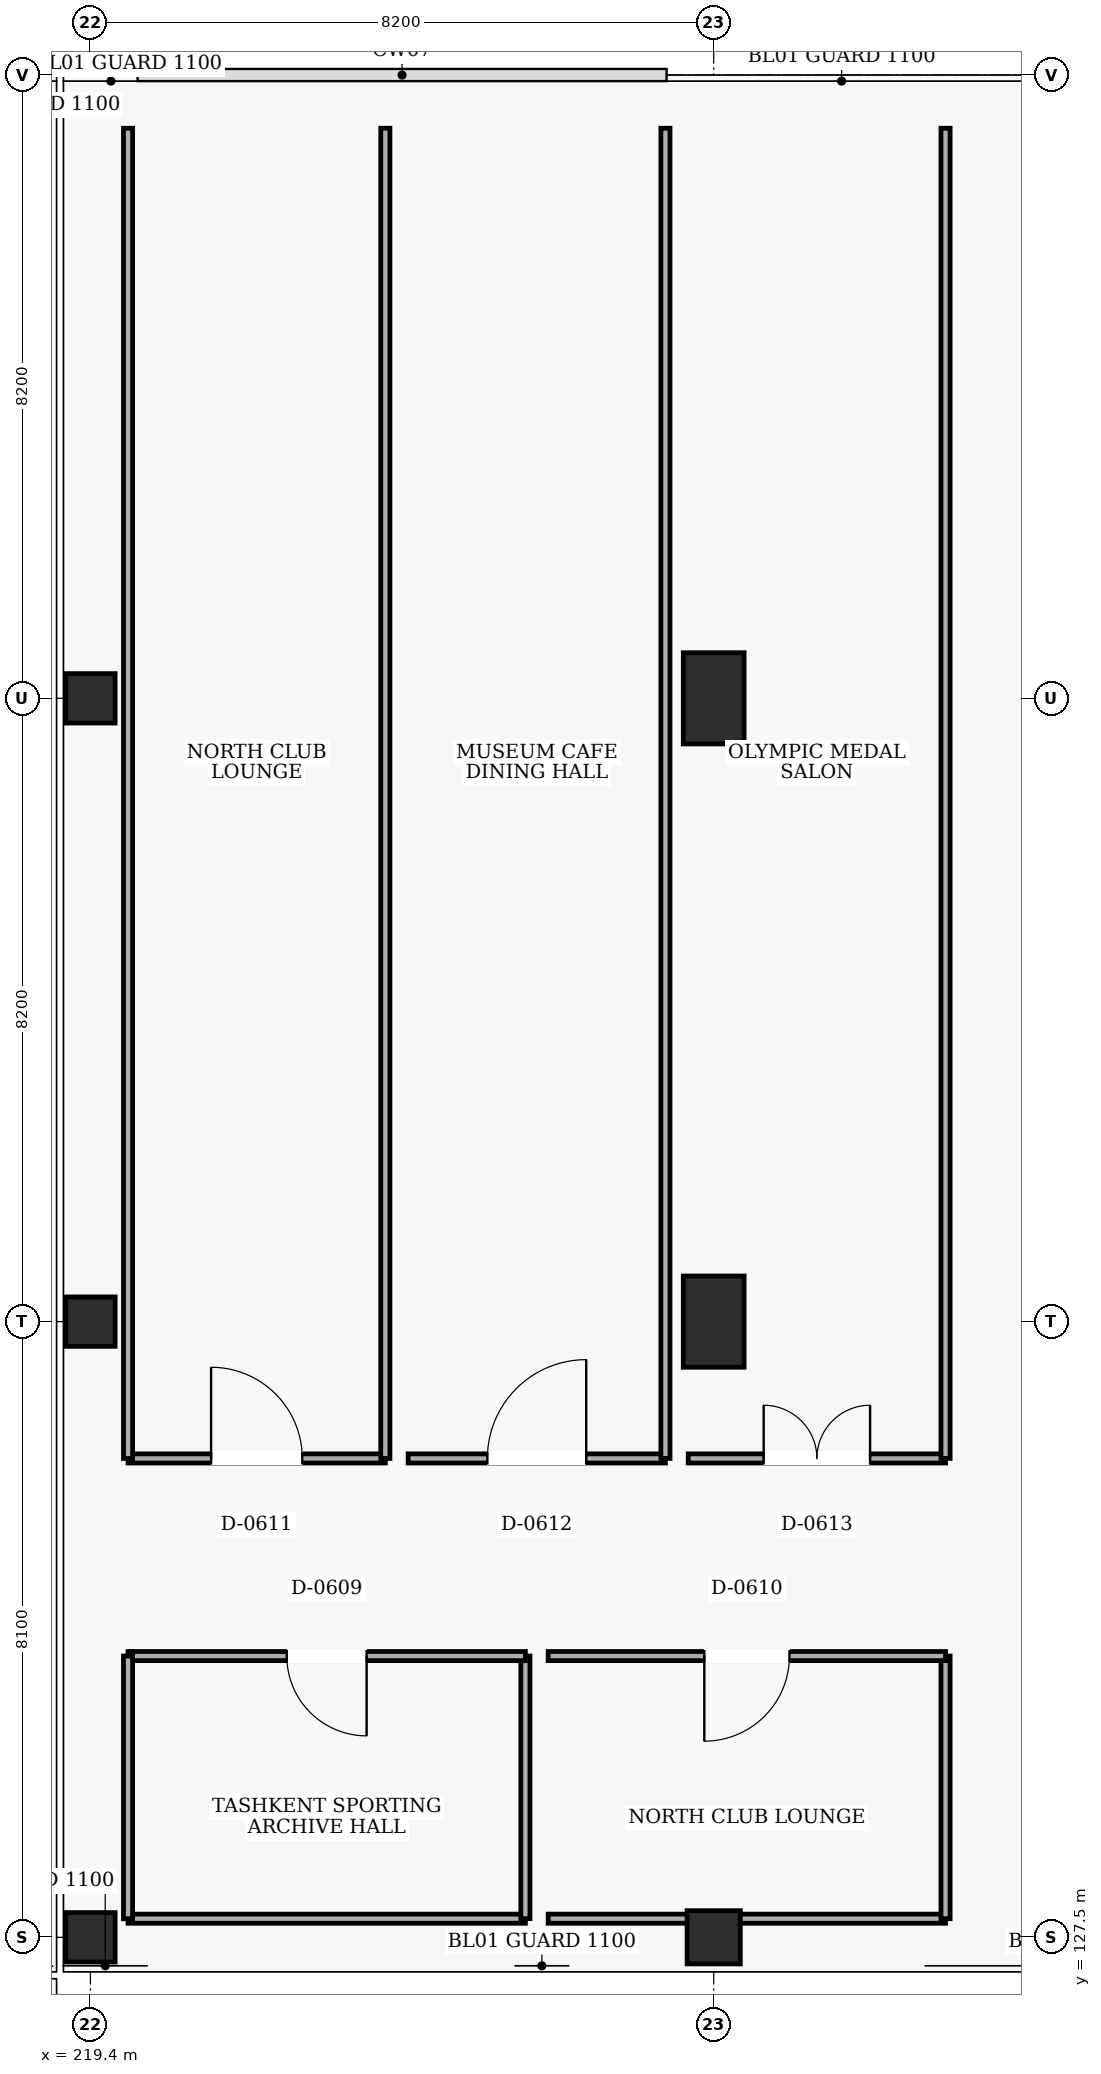
"""IFC4 building model, lengths in metres.
Left out: names, types, materials, properties, quantities, classifications, styles, units other than length and angle.
Written with IfcOpenShell. Run it as: python <this file> out.ifc"""

import sys

from ifc_helpers import new_model, si_unit, direction, frame, frame_2d, origin, origin_2d, place, context, subcontext, project, spatial, rectangle, extrude, element, fill, save


model = new_model("IFC4")
c1 = context("Model", 3, precision=1e-05, world=origin(), true_north=direction((0.0, 1.0)))
c2 = subcontext(c1, "Body", "Model", "MODEL_VIEW")
j1 = project(units=[si_unit("LENGTHUNIT", "METRE"), si_unit("PLANEANGLEUNIT", "RADIAN")], contexts=[c1])
p1 = place(None, origin())
s1 = spatial("IfcSite", under=j1, at=p1, CompositionType="ELEMENT")
p2 = place(p1, origin())
s2 = spatial("IfcBuilding", under=s1, at=p2, CompositionType="ELEMENT")
p3 = place(p2, frame((0.0, 0.0, 10.2)))
s3 = spatial("IfcBuildingStorey", under=s2, at=p3, CompositionType="ELEMENT", Elevation=10.2)
for number, where, z_axis, x_axis in (
    (1, (219.4, 127.5, 0.0), (0.0, 0.0, 1.0), (1.0, 0.0, 0.0)),
    (2, (219.4, 135.6, 0.0), (0.0, 0.0, 1.0), (1.0, 0.0, 0.0)),
    (3, (219.4, 143.8, 0.0), (0.0, 0.0, 1.0), (1.0, 0.0, 0.0)),
):
    element("IfcColumn", number, at=place(p3, frame(where, z_axis=z_axis, x_axis=x_axis)), inside=s3, PredefinedType="COLUMN", context=c2, shape_type="SweptSolid", body=[
        extrude(rectangle(XDim=0.65, YDim=0.65, at=origin_2d()), origin(), (0.0, 0.0, 1.0), 4.8),
    ])
p4 = place(p3, frame((227.6, 127.5, 0.0), z_axis=(0.0, 0.0, 1.0), x_axis=(1.0, 0.0, 0.0)))
e4 = element("IfcColumn", 4, at=p4, inside=s3, PredefinedType="COLUMN", context=c2, shape_type="SweptSolid", body=[
    extrude(rectangle(XDim=0.7, YDim=0.7, at=origin_2d()), origin(), (0.0, 0.0, 1.0), 4.8),
])
for number, where, z_axis, x_axis in (
    (5, (227.6, 135.6, 0.0), (0.0, 0.0, 1.0), (1.0, 0.0, 0.0)),
    (6, (227.6, 143.8, 0.0), (0.0, 0.0, 1.0), (1.0, 0.0, 0.0)),
):
    element("IfcColumn", number, at=place(p3, frame(where, z_axis=z_axis, x_axis=x_axis)), inside=s3, PredefinedType="COLUMN", context=c2, shape_type="SweptSolid", body=[
        extrude(rectangle(XDim=0.8, YDim=1.2, at=origin_2d()), origin(), (0.0, 0.0, 1.0), 4.8),
    ])
p5 = place(p3, frame((219.895, 127.745, 0.0), z_axis=(0.0, 0.0, 1.0), x_axis=(1.0, 0.0, 0.0)))
e7 = element("IfcWall", 7, at=p5, inside=s3, PredefinedType="PARTITIONING", context=c2, shape_type="SweptSolid", body=[
    extrude(rectangle(XDim=5.228, YDim=0.12, at=frame_2d((2.614, 0.0))), origin(), (0.0, 0.0, 1.0), 3.88),
])
p6 = place(p3, frame((225.123, 127.745, 0.0), z_axis=(0.0, 0.0, 1.0), x_axis=(0.0, 1.0, 0.0)))
e8 = element("IfcWall", 8, at=p6, inside=s3, PredefinedType="PARTITIONING", context=c2, shape_type="SweptSolid", body=[
    extrude(rectangle(XDim=3.455, YDim=0.12, at=frame_2d((1.728, 0.0))), origin(), (0.0, 0.0, 1.0), 4.48),
])
p7 = place(p3, frame((225.123, 131.2, 0.0), z_axis=(0.0, 0.0, 1.0), x_axis=(-1.0, 0.0, 0.0)))
e9 = element("IfcWall", 9, at=p7, inside=s3, PredefinedType="PARTITIONING", context=c2, shape_type="SweptSolid", body=[
    extrude(rectangle(XDim=5.228, YDim=0.12, at=frame_2d((2.614, 0.0))), origin(), (0.0, 0.0, 1.0), 4.48),
])
p8 = place(p7, frame((2.089, 0.0, 0.0)))
e10 = element("IfcOpeningElement", 10, at=p8, cuts=e9, PredefinedType="OPENING", context=c2, shape_type="SweptSolid", body=[
    extrude(rectangle(XDim=1.05, YDim=2.15, at=frame_2d((0.525, 1.075))), frame((0.0, 0.07, 0.0), z_axis=(0.0, -1.0, 0.0), x_axis=(1.0, 0.0, 0.0)), (0.0, 0.0, 1.0), 0.14),
])
p9 = place(p3, frame((219.895, 131.2, 0.0), z_axis=(0.0, 0.0, 1.0), x_axis=(0.0, -1.0, 0.0)))
e11 = element("IfcWall", 11, at=p9, inside=s3, PredefinedType="PARTITIONING", context=c2, shape_type="SweptSolid", body=[
    extrude(rectangle(XDim=3.455, YDim=0.12, at=frame_2d((1.728, 0.0))), origin(), (0.0, 0.0, 1.0), 4.48),
])
p10 = place(p3, frame((225.423, 127.745, 0.0), z_axis=(0.0, 0.0, 1.0), x_axis=(1.0, 0.0, 0.0)))
e12 = element("IfcWall", 12, at=p10, inside=s3, PredefinedType="PARTITIONING", context=c2, shape_type="SweptSolid", body=[
    extrude(rectangle(XDim=5.227, YDim=0.12, at=frame_2d((2.614, 0.0))), origin(), (0.0, 0.0, 1.0), 3.88),
])
p11 = place(p3, frame((230.65, 127.745, 0.0), z_axis=(0.0, 0.0, 1.0), x_axis=(0.0, 1.0, 0.0)))
e13 = element("IfcWall", 13, at=p11, inside=s3, PredefinedType="PARTITIONING", context=c2, shape_type="SweptSolid", body=[
    extrude(rectangle(XDim=3.455, YDim=0.12, at=frame_2d((1.728, 0.0))), origin(), (0.0, 0.0, 1.0), 4.48),
])
p12 = place(p3, frame((230.65, 131.2, 0.0), z_axis=(0.0, 0.0, 1.0), x_axis=(-1.0, 0.0, 0.0)))
e14 = element("IfcWall", 14, at=p12, inside=s3, PredefinedType="PARTITIONING", context=c2, shape_type="SweptSolid", body=[
    extrude(rectangle(XDim=5.227, YDim=0.12, at=frame_2d((2.614, 0.0))), origin(), (0.0, 0.0, 1.0), 4.48),
])
p13 = place(p12, frame((2.054, 0.0, 0.0)))
e15 = element("IfcOpeningElement", 15, at=p13, cuts=e14, PredefinedType="OPENING", context=c2, shape_type="SweptSolid", body=[
    extrude(rectangle(XDim=1.12, YDim=2.15, at=frame_2d((0.56, 1.075))), frame((0.0, 0.07, 0.0), z_axis=(0.0, -1.0, 0.0), x_axis=(1.0, 0.0, 0.0)), (0.0, 0.0, 1.0), 0.14),
])
p14 = place(p3, frame((219.895, 133.8, 0.0), z_axis=(0.0, 0.0, 1.0), x_axis=(1.0, 0.0, 0.0)))
e16 = element("IfcWall", 16, at=p14, inside=s3, PredefinedType="PARTITIONING", context=c2, shape_type="SweptSolid", body=[
    extrude(rectangle(XDim=3.385, YDim=0.12, at=frame_2d((1.692, 0.0))), origin(), (0.0, 0.0, 1.0), 4.48),
])
p15 = place(p14, frame((1.093, 0.0, 0.0)))
e17 = element("IfcOpeningElement", 17, at=p15, cuts=e16, PredefinedType="OPENING", context=c2, shape_type="SweptSolid", body=[
    extrude(rectangle(XDim=1.2, YDim=2.15, at=frame_2d((0.6, 1.075))), frame((0.0, 0.07, 0.0), z_axis=(0.0, -1.0, 0.0), x_axis=(1.0, 0.0, 0.0)), (0.0, 0.0, 1.0), 0.14),
])
for number, where, z_axis, x_axis in (
    (18, (223.28, 133.8, 0.0), (0.0, 0.0, 1.0), (0.0, 1.0, 0.0)),
    (19, (219.895, 151.3, 0.0), (0.0, 0.0, 1.0), (0.0, -1.0, 0.0)),
):
    element("IfcWall", number, at=place(p3, frame(where, z_axis=z_axis, x_axis=x_axis)), inside=s3, PredefinedType="PARTITIONING", context=c2, shape_type="SweptSolid", body=[
        extrude(rectangle(XDim=17.5, YDim=0.12, at=frame_2d((8.75, 0.0))), origin(), (0.0, 0.0, 1.0), 4.48),
    ])
p16 = place(p3, frame((223.58, 133.8, 0.0), z_axis=(0.0, 0.0, 1.0), x_axis=(1.0, 0.0, 0.0)))
e20 = element("IfcWall", 20, at=p16, inside=s3, PredefinedType="PARTITIONING", context=c2, shape_type="SweptSolid", body=[
    extrude(rectangle(XDim=3.385, YDim=0.12, at=frame_2d((1.692, 0.0))), origin(), (0.0, 0.0, 1.0), 4.48),
])
p17 = place(p16, frame((1.042, 0.0, 0.0)))
e21 = element("IfcOpeningElement", 21, at=p17, cuts=e20, PredefinedType="OPENING", context=c2, shape_type="SweptSolid", body=[
    extrude(rectangle(XDim=1.3, YDim=2.2, at=frame_2d((0.65, 1.1))), frame((0.0, 0.07, 0.0), z_axis=(0.0, -1.0, 0.0), x_axis=(1.0, 0.0, 0.0)), (0.0, 0.0, 1.0), 0.14),
])
p18 = place(p3, frame((226.965, 133.8, 0.0), z_axis=(0.0, 0.0, 1.0), x_axis=(0.0, 1.0, 0.0)))
e22 = element("IfcWall", 22, at=p18, inside=s3, PredefinedType="PARTITIONING", context=c2, shape_type="SweptSolid", body=[
    extrude(rectangle(XDim=17.5, YDim=0.12, at=frame_2d((8.75, 0.0))), origin(), (0.0, 0.0, 1.0), 4.48),
])
p19 = place(p3, frame((227.265, 133.8, 0.0), z_axis=(0.0, 0.0, 1.0), x_axis=(1.0, 0.0, 0.0)))
e23 = element("IfcWall", 23, at=p19, inside=s3, PredefinedType="PARTITIONING", context=c2, shape_type="SweptSolid", body=[
    extrude(rectangle(XDim=3.385, YDim=0.12, at=frame_2d((1.692, 0.0))), origin(), (0.0, 0.0, 1.0), 4.48),
])
p20 = place(p19, frame((0.992, 0.0, 0.0)))
e24 = element("IfcOpeningElement", 24, at=p20, cuts=e23, PredefinedType="OPENING", context=c2, shape_type="SweptSolid", body=[
    extrude(rectangle(XDim=1.4, YDim=2.2, at=frame_2d((0.7, 1.1))), frame((0.0, 0.07, 0.0), z_axis=(0.0, -1.0, 0.0), x_axis=(1.0, 0.0, 0.0)), (0.0, 0.0, 1.0), 0.14),
])
p21 = place(p3, frame((230.65, 133.8, 0.0), z_axis=(0.0, 0.0, 1.0), x_axis=(0.0, 1.0, 0.0)))
e25 = element("IfcWall", 25, at=p21, inside=s3, PredefinedType="PARTITIONING", context=c2, shape_type="SweptSolid", body=[
    extrude(rectangle(XDim=17.5, YDim=0.12, at=frame_2d((8.75, 0.0))), origin(), (0.0, 0.0, 1.0), 4.48),
])
p22 = place(p8, origin())
e26 = element("IfcDoor", 26, at=p22, inside=s3, OperationType="SINGLE_SWING_LEFT", PredefinedType="DOOR", context=c2, shape_type="SweptSolid", body=[
    extrude(rectangle(XDim=1.05, YDim=2.15, at=frame_2d((0.525, 1.075))), frame((0.0, 0.025, 0.0), z_axis=(0.0, -1.0, 0.0), x_axis=(1.0, 0.0, 0.0)), (0.0, 0.0, 1.0), 0.05),
])
fill(e10, e26)
p23 = place(p13, origin())
e27 = element("IfcDoor", 27, at=p23, inside=s3, OperationType="SINGLE_SWING_RIGHT", PredefinedType="DOOR", context=c2, shape_type="SweptSolid", body=[
    extrude(rectangle(XDim=1.12, YDim=2.15, at=frame_2d((0.56, 1.075))), frame((0.0, 0.025, 0.0), z_axis=(0.0, -1.0, 0.0), x_axis=(1.0, 0.0, 0.0)), (0.0, 0.0, 1.0), 0.05),
])
fill(e15, e27)
p24 = place(p15, origin())
e28 = element("IfcDoor", 28, at=p24, inside=s3, OperationType="SINGLE_SWING_LEFT", PredefinedType="DOOR", context=c2, shape_type="SweptSolid", body=[
    extrude(rectangle(XDim=1.2, YDim=2.15, at=frame_2d((0.6, 1.075))), frame((0.0, 0.025, 0.0), z_axis=(0.0, -1.0, 0.0), x_axis=(1.0, 0.0, 0.0)), (0.0, 0.0, 1.0), 0.05),
])
fill(e17, e28)
p25 = place(p17, origin())
e29 = element("IfcDoor", 29, at=p25, inside=s3, OperationType="SINGLE_SWING_RIGHT", PredefinedType="DOOR", context=c2, shape_type="SweptSolid", body=[
    extrude(rectangle(XDim=1.3, YDim=2.2, at=frame_2d((0.65, 1.1))), frame((0.0, 0.025, 0.0), z_axis=(0.0, -1.0, 0.0), x_axis=(1.0, 0.0, 0.0)), (0.0, 0.0, 1.0), 0.05),
])
fill(e21, e29)
p26 = place(p20, origin())
e30 = element("IfcDoor", 30, at=p26, inside=s3, OperationType="DOUBLE_DOOR_SINGLE_SWING", PredefinedType="DOOR", context=c2, shape_type="SweptSolid", body=[
    extrude(rectangle(XDim=1.4, YDim=2.2, at=frame_2d((0.7, 1.1))), frame((0.0, 0.025, 0.0), z_axis=(0.0, -1.0, 0.0), x_axis=(1.0, 0.0, 0.0)), (0.0, 0.0, 1.0), 0.05),
])
fill(e24, e30)
save(model, sys.argv[1])
